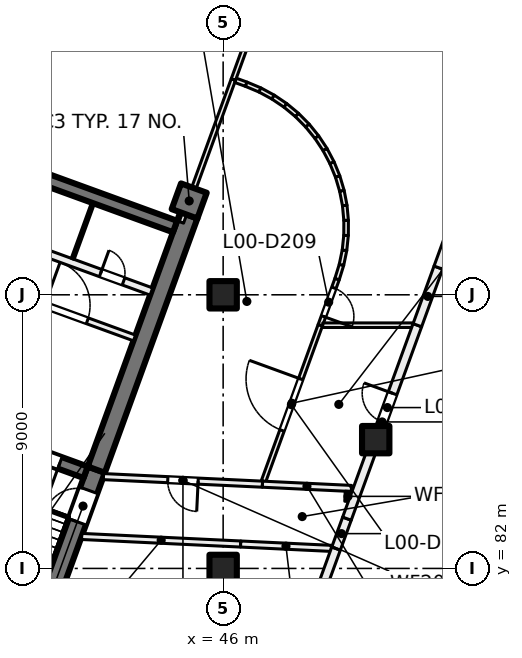
"""IFC4 building model, lengths in metres.
Left out: names, types, materials, properties, quantities, classifications, styles, units other than length and angle.
Written with IfcOpenShell. Run it as: python <this file> out.ifc"""

import sys

from ifc_helpers import new_model, si_unit, direction, frame, frame_2d, origin, origin_2d, place, context, subcontext, project, spatial, rectangle, extrude, element, fill, save


model = new_model("IFC4")
c1 = context("Model", 3, precision=1e-05, world=origin(), true_north=direction((0.0, 1.0)))
c2 = subcontext(c1, "Body", "Model", "MODEL_VIEW")
j1 = project(units=[si_unit("LENGTHUNIT", "METRE"), si_unit("PLANEANGLEUNIT", "RADIAN")], contexts=[c1])
p1 = place(None, origin())
s1 = spatial("IfcSite", under=j1, at=p1, CompositionType="ELEMENT")
p2 = place(p1, origin())
s2 = spatial("IfcBuilding", under=s1, at=p2, CompositionType="ELEMENT")
p3 = place(p2, origin())
s3 = spatial("IfcBuildingStorey", under=s2, at=p3, CompositionType="ELEMENT", Elevation=0.0)
for number, where, z_axis, x_axis in (
    (1, (46.0, 82.0, 0.0), (0.0, 0.0, 1.0), (1.0, 0.0, 0.0)),
    (2, (46.0, 91.0, 0.0), (0.0, 0.0, 1.0), (1.0, 0.0, 0.0)),
    (3, (51.019, 86.236, 0.0), (0.0, 0.0, 1.0), (1.0, 0.0, 0.0)),
    (4, (44.884, 94.087, 0.0), (0.0, 0.0, 1.0), (-0.342, -0.94, 0.0)),
):
    element("IfcColumn", number, at=place(p3, frame(where, z_axis=z_axis, x_axis=x_axis)), inside=s3, PredefinedType="COLUMN", context=c2, shape_type="SweptSolid", body=[
        extrude(rectangle(XDim=0.9, YDim=0.9, at=origin_2d()), origin(), (0.0, 0.0, 1.0), 7.5),
    ])
p4 = place(p3, frame((39.159, 77.92, 0.0), z_axis=(0.0, 0.0, 1.0), x_axis=(0.342016982193, 0.939693771338, 0.0)))
e5 = element("IfcWall", 5, at=p4, inside=s3, PredefinedType="SHEAR", context=c2, shape_type="SweptSolid", body=[
    extrude(rectangle(XDim=7.8, YDim=0.6, at=frame_2d((3.9, 0.0))), origin(), (0.0, 0.0, 1.0), 7.5),
])
p5 = place(p4, frame((5.975, 0.0, 0.0)))
e6 = element("IfcOpeningElement", 6, at=p5, cuts=e5, PredefinedType="OPENING", context=c2, shape_type="SweptSolid", body=[
    extrude(rectangle(XDim=1.1, YDim=2.1, at=frame_2d((0.55, 1.05))), frame((0.0, 0.31, 0.0), z_axis=(0.0, -1.0, 0.0), x_axis=(1.0, 0.0, 0.0)), (0.0, 0.0, 1.0), 0.62),
])
p6 = place(p3, frame((41.827, 85.249, 0.0), z_axis=(0.0, 0.0, 1.0), x_axis=(0.342016162452, 0.939694069696, 0.0)))
e7 = element("IfcWall", 7, at=p6, inside=s3, PredefinedType="SHEAR", context=c2, shape_type="SweptSolid", body=[
    extrude(rectangle(XDim=8.9, YDim=0.6, at=frame_2d((4.45, 0.0))), origin(), (0.0, 0.0, 1.0), 7.5),
])
p7 = place(p3, frame((41.476, 85.164, 0.0), z_axis=(0.0, 0.0, 1.0), x_axis=(-0.939678810556, 0.342058084236, 0.0)))
e8 = element("IfcWall", 8, at=p7, inside=s3, PredefinedType="SHEAR", context=c2, shape_type="SweptSolid", body=[
    extrude(rectangle(XDim=2.8, YDim=0.4, at=frame_2d((1.4, 0.0))), origin(), (0.0, 0.0, 1.0), 7.5),
])
p8 = place(p7, frame((0.9, 0.0, 0.0)))
e9 = element("IfcOpeningElement", 9, at=p8, cuts=e8, PredefinedType="OPENING", context=c2, shape_type="SweptSolid", body=[
    extrude(rectangle(XDim=1.0, YDim=2.1, at=frame_2d((0.5, 1.05))), frame((0.0, 0.21, 0.0), z_axis=(0.0, -1.0, 0.0), x_axis=(1.0, 0.0, 0.0)), (0.0, 0.0, 1.0), 0.42),
])
p9 = place(p3, frame((44.418, 93.245, 0.0), z_axis=(0.0, 0.0, 1.0), x_axis=(-0.93969060187, 0.342025690201, 0.0)))
e10 = element("IfcWall", 10, at=p9, inside=s3, PredefinedType="SHEAR", context=c2, shape_type="SweptSolid", body=[
    extrude(rectangle(XDim=8.6, YDim=0.4, at=frame_2d((4.3, 0.0))), origin(), (0.0, 0.0, 1.0), 7.5),
])
p10 = place(p3, frame((35.19, 92.453, 0.0), z_axis=(0.0, 0.0, 1.0), x_axis=(0.939691552312, -0.342023078919, 0.0)))
e11 = element("IfcWall", 11, at=p10, inside=s3, PredefinedType="PARTITIONING", context=c2, shape_type="SweptSolid", body=[
    extrude(rectangle(XDim=8.4, YDim=0.2, at=frame_2d((4.2, 0.0))), origin(), (0.0, 0.0, 1.0), 7.1),
])
p11 = place(p10, frame((5.25, 0.0, 0.0)))
e12 = element("IfcOpeningElement", 12, at=p11, cuts=e11, PredefinedType="OPENING", context=c2, shape_type="SweptSolid", body=[
    extrude(rectangle(XDim=1.5, YDim=2.1, at=frame_2d((0.75, 1.05))), frame((0.0, 0.11, 0.0), z_axis=(0.0, -1.0, 0.0), x_axis=(1.0, 0.0, 0.0)), (0.0, 0.0, 1.0), 0.22),
])
p12 = place(p3, frame((35.746, 93.98, 0.0), z_axis=(0.0, 0.0, 1.0), x_axis=(0.939691552312, -0.342023078919, 0.0)))
e13 = element("IfcWall", 13, at=p12, inside=s3, PredefinedType="PARTITIONING", context=c2, shape_type="SweptSolid", body=[
    extrude(rectangle(XDim=8.4, YDim=0.25, at=frame_2d((4.2, 0.0))), origin(), (0.0, 0.0, 1.0), 7.1),
])
p13 = place(p12, frame((2.375, 0.0, 0.0)))
e14 = element("IfcOpeningElement", 14, at=p13, cuts=e13, PredefinedType="OPENING", context=c2, shape_type="SweptSolid", body=[
    extrude(rectangle(XDim=0.8, YDim=2.1, at=frame_2d((0.4, 1.05))), frame((0.0, 0.135, 0.0), z_axis=(0.0, -1.0, 0.0), x_axis=(1.0, 0.0, 0.0)), (0.0, 0.0, 1.0), 0.27),
])
p14 = place(p12, frame((6.625, 0.0, 0.0)))
e15 = element("IfcOpeningElement", 15, at=p14, cuts=e13, PredefinedType="OPENING", context=c2, shape_type="SweptSolid", body=[
    extrude(rectangle(XDim=0.8, YDim=2.1, at=frame_2d((0.4, 1.05))), frame((0.0, 0.135, 0.0), z_axis=(0.0, -1.0, 0.0), x_axis=(1.0, 0.0, 0.0)), (0.0, 0.0, 1.0), 0.27),
])
p15 = place(p3, frame((41.718, 94.015, 0.0), z_axis=(0.0, 0.0, 1.0), x_axis=(-0.342064742067, -0.939676386973, 0.0)))
e16 = element("IfcWall", 16, at=p15, inside=s3, PredefinedType="PARTITIONING", context=c2, shape_type="SweptSolid", body=[
    extrude(rectangle(XDim=1.95, YDim=0.1, at=frame_2d((0.975, 0.0))), origin(), (0.0, 0.0, 1.0), 7.1),
])
p16 = place(p3, frame((41.347, 83.052, 0.0), z_axis=(0.0, 0.0, 1.0), x_axis=(0.998867926688, -0.04756958097, 0.0)))
e17 = element("IfcWall", 17, at=p16, inside=s3, PredefinedType="PARTITIONING", context=c2, shape_type="SweptSolid", body=[
    extrude(rectangle(XDim=5.235, YDim=0.2, at=frame_2d((2.617, 0.0))), origin(), (0.0, 0.0, 1.0), 7.1),
])
p17 = place(p3, frame((42.063, 85.02, 0.0), z_axis=(0.0, 0.0, 1.0), x_axis=(0.998868348702, -0.047560718685, 0.0)))
e18 = element("IfcWall", 18, at=p17, inside=s3, PredefinedType="PARTITIONING", context=c2, shape_type="SweptSolid", body=[
    extrude(rectangle(XDim=5.236, YDim=0.2, at=frame_2d((2.618, 0.0))), origin(), (0.0, 0.0, 1.0), 7.1),
])
p18 = place(p17, frame((2.118, 0.0, 0.0)))
e19 = element("IfcOpeningElement", 19, at=p18, cuts=e18, PredefinedType="OPENING", context=c2, shape_type="SweptSolid", body=[
    extrude(rectangle(XDim=1.0, YDim=2.1, at=frame_2d((0.5, 1.05))), frame((0.0, 0.11, 0.0), z_axis=(0.0, -1.0, 0.0), x_axis=(1.0, 0.0, 0.0)), (0.0, 0.0, 1.0), 0.22),
])
p19 = place(p3, frame((44.627, 93.382, 0.0), z_axis=(0.0, 0.0, 1.0), x_axis=(0.342025351501, 0.939690725149, 0.0)))
e20 = element("IfcWall", 20, at=p19, inside=s3, PredefinedType="PARTITIONING", context=c2, shape_type="SweptSolid", body=[
    extrude(rectangle(XDim=5.0, YDim=0.15, at=frame_2d((2.5, 0.0))), origin(), (0.0, 0.0, 1.0), 7.1),
])
p20 = place(p3, frame((46.407, 98.054, 0.0), z_axis=(0.0, 0.0, 1.0), x_axis=(0.939944328342, -0.341327789109, 0.0)))
e21 = element("IfcWall", 21, at=p20, inside=s3, PredefinedType="PARTITIONING", context=c2, shape_type="SweptSolid", body=[
    extrude(rectangle(XDim=0.378, YDim=0.15, at=frame_2d((0.189, 0.0))), origin(), (0.0, 0.0, 1.0), 7.1),
])
p21 = place(p3, frame((46.337, 98.08, 0.0), z_axis=(0.0, 0.0, 1.0), x_axis=(0.342113136459, 0.939658768842, 0.0)))
e22 = element("IfcWall", 22, at=p21, inside=s3, PredefinedType="PARTITIONING", context=c2, shape_type="SweptSolid", body=[
    extrude(rectangle(XDim=6.25, YDim=0.15, at=frame_2d((3.125, 0.0))), origin(), (0.0, 0.0, 1.0), 7.1),
])
p22 = place(p3, frame((46.576, 82.803, 0.0), z_axis=(0.0, 0.0, 1.0), x_axis=(0.998850300233, -0.047938269937, 0.0)))
e23 = element("IfcWall", 23, at=p22, inside=s3, PredefinedType="PARTITIONING", context=c2, shape_type="SweptSolid", body=[
    extrude(rectangle(XDim=2.984, YDim=0.2, at=frame_2d((1.492, 0.0))), origin(), (0.0, 0.0, 1.0), 7.1),
])
p23 = place(p3, frame((46.758, 97.927, 0.0), z_axis=(0.0, 0.0, 1.0), x_axis=(0.922024303007, -0.387131999019, 0.0)))
e24 = element("IfcWall", 24, at=p23, inside=s3, PredefinedType="PARTITIONING", context=c2, shape_type="SweptSolid", body=[
    extrude(rectangle(XDim=0.496, YDim=0.15, at=frame_2d((0.248, 0.0))), origin(), (0.0, 0.0, 1.0), 7.1),
])
p24 = place(p3, frame((47.209, 97.738, 0.0), z_axis=(0.0, 0.0, 1.0), x_axis=(0.878624509573, -0.47751332042, 0.0)))
e25 = element("IfcWall", 25, at=p24, inside=s3, PredefinedType="PARTITIONING", context=c2, shape_type="SweptSolid", body=[
    extrude(rectangle(XDim=0.499, YDim=0.15, at=frame_2d((0.249, 0.0))), origin(), (0.0, 0.0, 1.0), 7.1),
])
p25 = place(p3, frame((49.196, 90.0, 0.0), z_axis=(0.0, 0.0, 1.0), x_axis=(-0.34191897106, -0.939729438312, 0.0)))
e26 = element("IfcWall", 26, at=p25, inside=s3, PredefinedType="PARTITIONING", context=c2, shape_type="SweptSolid", body=[
    extrude(rectangle(XDim=5.46, YDim=0.15, at=frame_2d((2.73, 0.0))), origin(), (0.0, 0.0, 1.0), 7.1),
])
p26 = place(p25, frame((1.883, 0.0, 0.0)))
e27 = element("IfcOpeningElement", 27, at=p26, cuts=e26, PredefinedType="OPENING", context=c2, shape_type="SweptSolid", body=[
    extrude(rectangle(XDim=1.8, YDim=2.1, at=frame_2d((0.9, 1.05))), frame((0.0, 0.085, 0.0), z_axis=(0.0, -1.0, 0.0), x_axis=(1.0, 0.0, 0.0)), (0.0, 0.0, 1.0), 0.17),
])
p27 = place(p3, frame((47.293, 84.771, 0.0), z_axis=(0.0, 0.0, 1.0), x_axis=(0.99885982877, -0.047739317865, 0.0)))
e28 = element("IfcWall", 28, at=p27, inside=s3, PredefinedType="PARTITIONING", context=c2, shape_type="SweptSolid", body=[
    extrude(rectangle(XDim=2.93, YDim=0.2, at=frame_2d((1.465, 0.0))), origin(), (0.0, 0.0, 1.0), 7.1),
])
p28 = place(p3, frame((47.608, 76.866, 0.0), z_axis=(0.0, 0.0, 1.0), x_axis=(0.342000874947, 0.939699633678, 0.0)))
e29 = element("IfcWall", 29, at=p28, inside=s3, PredefinedType="PARTITIONING", context=c2, shape_type="SweptSolid", body=[
    extrude(rectangle(XDim=6.158, YDim=0.3, at=frame_2d((3.079, 0.0))), origin(), (0.0, 0.0, 1.0), 11.1),
])
p29 = place(p3, frame((47.641, 97.504, 0.0), z_axis=(0.0, 0.0, 1.0), x_axis=(0.829013848944, -0.559228073561, 0.0)))
e30 = element("IfcWall", 30, at=p29, inside=s3, PredefinedType="PARTITIONING", context=c2, shape_type="SweptSolid", body=[
    extrude(rectangle(XDim=0.497, YDim=0.15, at=frame_2d((0.249, 0.0))), origin(), (0.0, 0.0, 1.0), 7.1),
])
p30 = place(p3, frame((48.047, 97.23, 0.0), z_axis=(0.0, 0.0, 1.0), x_axis=(0.770145329221, -0.637868459699, 0.0)))
e31 = element("IfcWall", 31, at=p30, inside=s3, PredefinedType="PARTITIONING", context=c2, shape_type="SweptSolid", body=[
    extrude(rectangle(XDim=0.498, YDim=0.15, at=frame_2d((0.249, 0.0))), origin(), (0.0, 0.0, 1.0), 7.1),
])
p31 = place(p3, frame((48.425, 96.917, 0.0), z_axis=(0.0, 0.0, 1.0), x_axis=(0.702936615275, -0.711252497293, 0.0)))
e32 = element("IfcWall", 32, at=p31, inside=s3, PredefinedType="PARTITIONING", context=c2, shape_type="SweptSolid", body=[
    extrude(rectangle(XDim=0.499, YDim=0.15, at=frame_2d((0.25, 0.0))), origin(), (0.0, 0.0, 1.0), 7.1),
])
for number, where, z_axis, x_axis in (
    (33, (48.771, 96.568, 0.0), (0.0, 0.0, 1.0), (0.629, -0.778, 0.0)),
    (34, (49.08, 96.187, 0.0), (0.0, 0.0, 1.0), (0.552, -0.834, 0.0)),
):
    element("IfcWall", number, at=place(p3, frame(where, z_axis=z_axis, x_axis=x_axis)), inside=s3, PredefinedType="PARTITIONING", context=c2, shape_type="SweptSolid", body=[
        extrude(rectangle(XDim=0.498, YDim=0.15, at=frame_2d((0.249, 0.0))), origin(), (0.0, 0.0, 1.0), 7.1),
    ])
p32 = place(p3, frame((49.749, 91.52, 0.0), z_axis=(0.0, 0.0, 1.0), x_axis=(-0.341876370555, -0.93974493734, 0.0)))
e35 = element("IfcWall", 35, at=p32, inside=s3, PredefinedType="PARTITIONING", context=c2, shape_type="SweptSolid", body=[
    extrude(rectangle(XDim=1.617, YDim=0.15, at=frame_2d((0.809, 0.0))), origin(), (0.0, 0.0, 1.0), 7.1),
])
p33 = place(p32, frame((0.311, 0.0, 0.0)))
e36 = element("IfcOpeningElement", 36, at=p33, cuts=e35, PredefinedType="OPENING", context=c2, shape_type="SweptSolid", body=[
    extrude(rectangle(XDim=1.0, YDim=2.1, at=frame_2d((0.5, 1.05))), frame((0.0, 0.085, 0.0), z_axis=(0.0, -1.0, 0.0), x_axis=(1.0, 0.0, 0.0)), (0.0, 0.0, 1.0), 0.17),
])
p34 = place(p3, frame((49.276, 90.0, 0.0), z_axis=(0.0, 0.0, 1.0), x_axis=(1.0, 0.0, 0.0)))
e37 = element("IfcWall", 37, at=p34, inside=s3, PredefinedType="PARTITIONING", context=c2, shape_type="SweptSolid", body=[
    extrude(rectangle(XDim=2.952, YDim=0.15, at=frame_2d((1.476, 0.0))), origin(), (0.0, 0.0, 1.0), 7.1),
])
p35 = place(p3, frame((49.351, 95.778, 0.0), z_axis=(0.0, 0.0, 1.0), x_axis=(0.46615085347, -0.884705251374, 0.0)))
e38 = element("IfcWall", 38, at=p35, inside=s3, PredefinedType="PARTITIONING", context=c2, shape_type="SweptSolid", body=[
    extrude(rectangle(XDim=0.498, YDim=0.15, at=frame_2d((0.249, 0.0))), origin(), (0.0, 0.0, 1.0), 7.1),
])
p36 = place(p3, frame((49.58, 95.344, 0.0), z_axis=(0.0, 0.0, 1.0), x_axis=(0.378326719955, -0.925672130383, 0.0)))
e39 = element("IfcWall", 39, at=p36, inside=s3, PredefinedType="PARTITIONING", context=c2, shape_type="SweptSolid", body=[
    extrude(rectangle(XDim=0.497, YDim=0.15, at=frame_2d((0.249, 0.0))), origin(), (0.0, 0.0, 1.0), 7.1),
])
p37 = place(p3, frame((49.714, 82.653, 0.0), z_axis=(0.0, 0.0, 1.0), x_axis=(0.341855399979, 0.939752566107, 0.0)))
e40 = element("IfcWall", 40, at=p37, inside=s3, PredefinedType="PARTITIONING", context=c2, shape_type="SweptSolid", body=[
    extrude(rectangle(XDim=1.047, YDim=0.3, at=frame_2d((0.523, 0.0))), origin(), (0.0, 0.0, 1.0), 11.1),
])
p38 = place(p3, frame((49.747, 91.516, 0.0), z_axis=(0.0, 0.0, 1.0), x_axis=(0.296228958727, 0.955116958289, 0.0)))
e41 = element("IfcWall", 41, at=p38, inside=s3, PredefinedType="PARTITIONING", context=c2, shape_type="SweptSolid", body=[
    extrude(rectangle(XDim=0.496, YDim=0.15, at=frame_2d((0.248, 0.0))), origin(), (0.0, 0.0, 1.0), 7.1),
])
p39 = place(p3, frame((49.766, 94.891, 0.0), z_axis=(0.0, 0.0, 1.0), x_axis=(0.283938571221, -0.958842472867, 0.0)))
e42 = element("IfcWall", 42, at=p39, inside=s3, PredefinedType="PARTITIONING", context=c2, shape_type="SweptSolid", body=[
    extrude(rectangle(XDim=0.5, YDim=0.15, at=frame_2d((0.25, 0.0))), origin(), (0.0, 0.0, 1.0), 7.1),
])
p40 = place(p3, frame((49.892, 91.983, 0.0), z_axis=(0.0, 0.0, 1.0), x_axis=(0.202330199798, 0.979317359312, 0.0)))
e43 = element("IfcWall", 43, at=p40, inside=s3, PredefinedType="PARTITIONING", context=c2, shape_type="SweptSolid", body=[
    extrude(rectangle(XDim=0.498, YDim=0.15, at=frame_2d((0.249, 0.0))), origin(), (0.0, 0.0, 1.0), 7.1),
])
p41 = place(p3, frame((49.906, 94.42, 0.0), z_axis=(0.0, 0.0, 1.0), x_axis=(0.190646652196, -0.981658725834, 0.0)))
e44 = element("IfcWall", 44, at=p41, inside=s3, PredefinedType="PARTITIONING", context=c2, shape_type="SweptSolid", body=[
    extrude(rectangle(XDim=0.498, YDim=0.15, at=frame_2d((0.249, 0.0))), origin(), (0.0, 0.0, 1.0), 7.1),
])
p42 = place(p3, frame((49.992, 92.463, 0.0), z_axis=(0.0, 0.0, 1.0), x_axis=(0.102314560958, 0.994752095055, 0.0)))
e45 = element("IfcWall", 45, at=p42, inside=s3, PredefinedType="PARTITIONING", context=c2, shape_type="SweptSolid", body=[
    extrude(rectangle(XDim=0.499, YDim=0.15, at=frame_2d((0.25, 0.0))), origin(), (0.0, 0.0, 1.0), 7.1),
])
for number, where, z_axis, x_axis in (
    (46, (50.0, 93.939, 0.0), (0.0, 0.0, 1.0), (0.09, -0.996, 0.0)),
    (47, (50.043, 92.951, 0.0), (0.0, 0.0, 1.0), (0.004, 1.0, 0.0)),
):
    element("IfcWall", number, at=place(p3, frame(where, z_axis=z_axis, x_axis=x_axis)), inside=s3, PredefinedType="PARTITIONING", context=c2, shape_type="SweptSolid", body=[
        extrude(rectangle(XDim=0.499, YDim=0.15, at=frame_2d((0.25, 0.0))), origin(), (0.0, 0.0, 1.0), 7.1),
    ])
p43 = place(p3, frame((50.1, 84.205, 0.0), z_axis=(0.0, 0.0, 1.0), x_axis=(0.044972900842, 0.998988207233, 0.0)))
e48 = element("IfcWall", 48, at=p43, inside=s3, PredefinedType="PARTITIONING", context=c2, shape_type="SweptSolid", body=[
    extrude(rectangle(XDim=0.331, YDim=0.2, at=frame_2d((0.166, 0.0))), origin(), (0.0, 0.0, 1.0), 7.1),
])
p44 = place(p3, frame((52.388, 90.0, 0.0), z_axis=(0.0, 0.0, 1.0), x_axis=(-0.342015169862, -0.939694430964, 0.0)))
e49 = element("IfcWall", 49, at=p44, inside=s3, PredefinedType="PARTITIONING", context=c2, shape_type="SweptSolid", body=[
    extrude(rectangle(XDim=6.771, YDim=0.3, at=frame_2d((3.386, 0.0))), origin(), (0.0, 0.0, 1.0), 11.1),
])
p45 = place(p44, frame((2.383, 0.0, 0.0)))
e50 = element("IfcOpeningElement", 50, at=p45, cuts=e49, PredefinedType="OPENING", context=c2, shape_type="SweptSolid", body=[
    extrude(rectangle(XDim=1.0, YDim=2.1, at=frame_2d((0.5, 1.05))), frame((0.0, 0.16, 0.0), z_axis=(0.0, -1.0, 0.0), x_axis=(1.0, 0.0, 0.0)), (0.0, 0.0, 1.0), 0.32),
])
p46 = place(p3, frame((52.388, 90.0, 0.0), z_axis=(0.0, 0.0, 1.0), x_axis=(0.342112398827, 0.939659037401, 0.0)))
e51 = element("IfcWall", 51, at=p46, inside=s3, PredefinedType="PARTITIONING", context=c2, shape_type="SweptSolid", body=[
    extrude(rectangle(XDim=2.017, YDim=0.3, at=frame_2d((1.008, 0.0))), origin(), (0.0, 0.0, 1.0), 11.1),
])
p47 = place(p3, frame((53.078, 91.895, 0.0), z_axis=(0.0, 0.0, 1.0), x_axis=(0.342084828481, 0.939669074793, 0.0)))
e52 = element("IfcWall", 52, at=p47, inside=s3, PredefinedType="PARTITIONING", context=c2, shape_type="SweptSolid", body=[
    extrude(rectangle(XDim=2.696, YDim=0.3, at=frame_2d((1.348, 0.0))), origin(), (0.0, 0.0, 1.0), 11.1),
])
p48 = place(p11, origin())
e53 = element("IfcDoor", 53, at=p48, inside=s3, OperationType="DOUBLE_DOOR_SINGLE_SWING", PredefinedType="DOOR", context=c2, shape_type="SweptSolid", body=[
    extrude(rectangle(XDim=1.5, YDim=2.1, at=frame_2d((0.75, 1.05))), frame((0.0, 0.025, 0.0), z_axis=(0.0, -1.0, 0.0), x_axis=(1.0, 0.0, 0.0)), (0.0, 0.0, 1.0), 0.05),
])
fill(e12, e53)
p49 = place(p8, origin())
e54 = element("IfcDoor", 54, at=p49, inside=s3, OperationType="SINGLE_SWING_RIGHT", PredefinedType="DOOR", context=c2, shape_type="SweptSolid", body=[
    extrude(rectangle(XDim=1.0, YDim=2.1, at=frame_2d((0.5, 1.05))), frame((0.0, 0.025, 0.0), z_axis=(0.0, -1.0, 0.0), x_axis=(1.0, 0.0, 0.0)), (0.0, 0.0, 1.0), 0.05),
])
fill(e9, e54)
p50 = place(p14, origin())
e55 = element("IfcDoor", 55, at=p50, inside=s3, OperationType="SINGLE_SWING_LEFT", PredefinedType="DOOR", context=c2, shape_type="SweptSolid", body=[
    extrude(rectangle(XDim=0.8, YDim=2.1, at=frame_2d((0.4, 1.05))), frame((0.0, 0.025, 0.0), z_axis=(0.0, -1.0, 0.0), x_axis=(1.0, 0.0, 0.0)), (0.0, 0.0, 1.0), 0.05),
])
fill(e15, e55)
p51 = place(p5, origin())
e56 = element("IfcDoor", 56, at=p51, inside=s3, OperationType="SINGLE_SWING_LEFT", PredefinedType="DOOR", context=c2, shape_type="SweptSolid", body=[
    extrude(rectangle(XDim=1.1, YDim=2.1, at=frame_2d((0.55, 1.05))), frame((0.0, 0.025, 0.0), z_axis=(0.0, -1.0, 0.0), x_axis=(1.0, 0.0, 0.0)), (0.0, 0.0, 1.0), 0.05),
])
fill(e6, e56)
p52 = place(p18, origin())
e57 = element("IfcDoor", 57, at=p52, inside=s3, OperationType="SINGLE_SWING_RIGHT", PredefinedType="DOOR", context=c2, shape_type="SweptSolid", body=[
    extrude(rectangle(XDim=1.0, YDim=2.1, at=frame_2d((0.5, 1.05))), frame((0.0, 0.025, 0.0), z_axis=(0.0, -1.0, 0.0), x_axis=(1.0, 0.0, 0.0)), (0.0, 0.0, 1.0), 0.05),
])
fill(e19, e57)
p53 = place(p26, origin())
e58 = element("IfcDoor", 58, at=p53, inside=s3, OperationType="DOUBLE_DOOR_SINGLE_SWING", PredefinedType="DOOR", context=c2, shape_type="SweptSolid", body=[
    extrude(rectangle(XDim=1.8, YDim=2.1, at=frame_2d((0.9, 1.05))), frame((0.0, 0.025, 0.0), z_axis=(0.0, -1.0, 0.0), x_axis=(1.0, 0.0, 0.0)), (0.0, 0.0, 1.0), 0.05),
])
fill(e27, e58)
p54 = place(p33, origin())
e59 = element("IfcDoor", 59, at=p54, inside=s3, OperationType="SINGLE_SWING_RIGHT", PredefinedType="DOOR", context=c2, shape_type="SweptSolid", body=[
    extrude(rectangle(XDim=1.0, YDim=2.1, at=frame_2d((0.5, 1.05))), frame((0.0, 0.025, 0.0), z_axis=(0.0, -1.0, 0.0), x_axis=(1.0, 0.0, 0.0)), (0.0, 0.0, 1.0), 0.05),
])
fill(e36, e59)
p55 = place(p45, origin())
e60 = element("IfcDoor", 60, at=p55, inside=s3, OperationType="SINGLE_SWING_LEFT", PredefinedType="DOOR", context=c2, shape_type="SweptSolid", body=[
    extrude(rectangle(XDim=1.0, YDim=2.1, at=frame_2d((0.5, 1.05))), frame((0.0, 0.025, 0.0), z_axis=(0.0, -1.0, 0.0), x_axis=(1.0, 0.0, 0.0)), (0.0, 0.0, 1.0), 0.05),
])
fill(e50, e60)
save(model, sys.argv[1])
